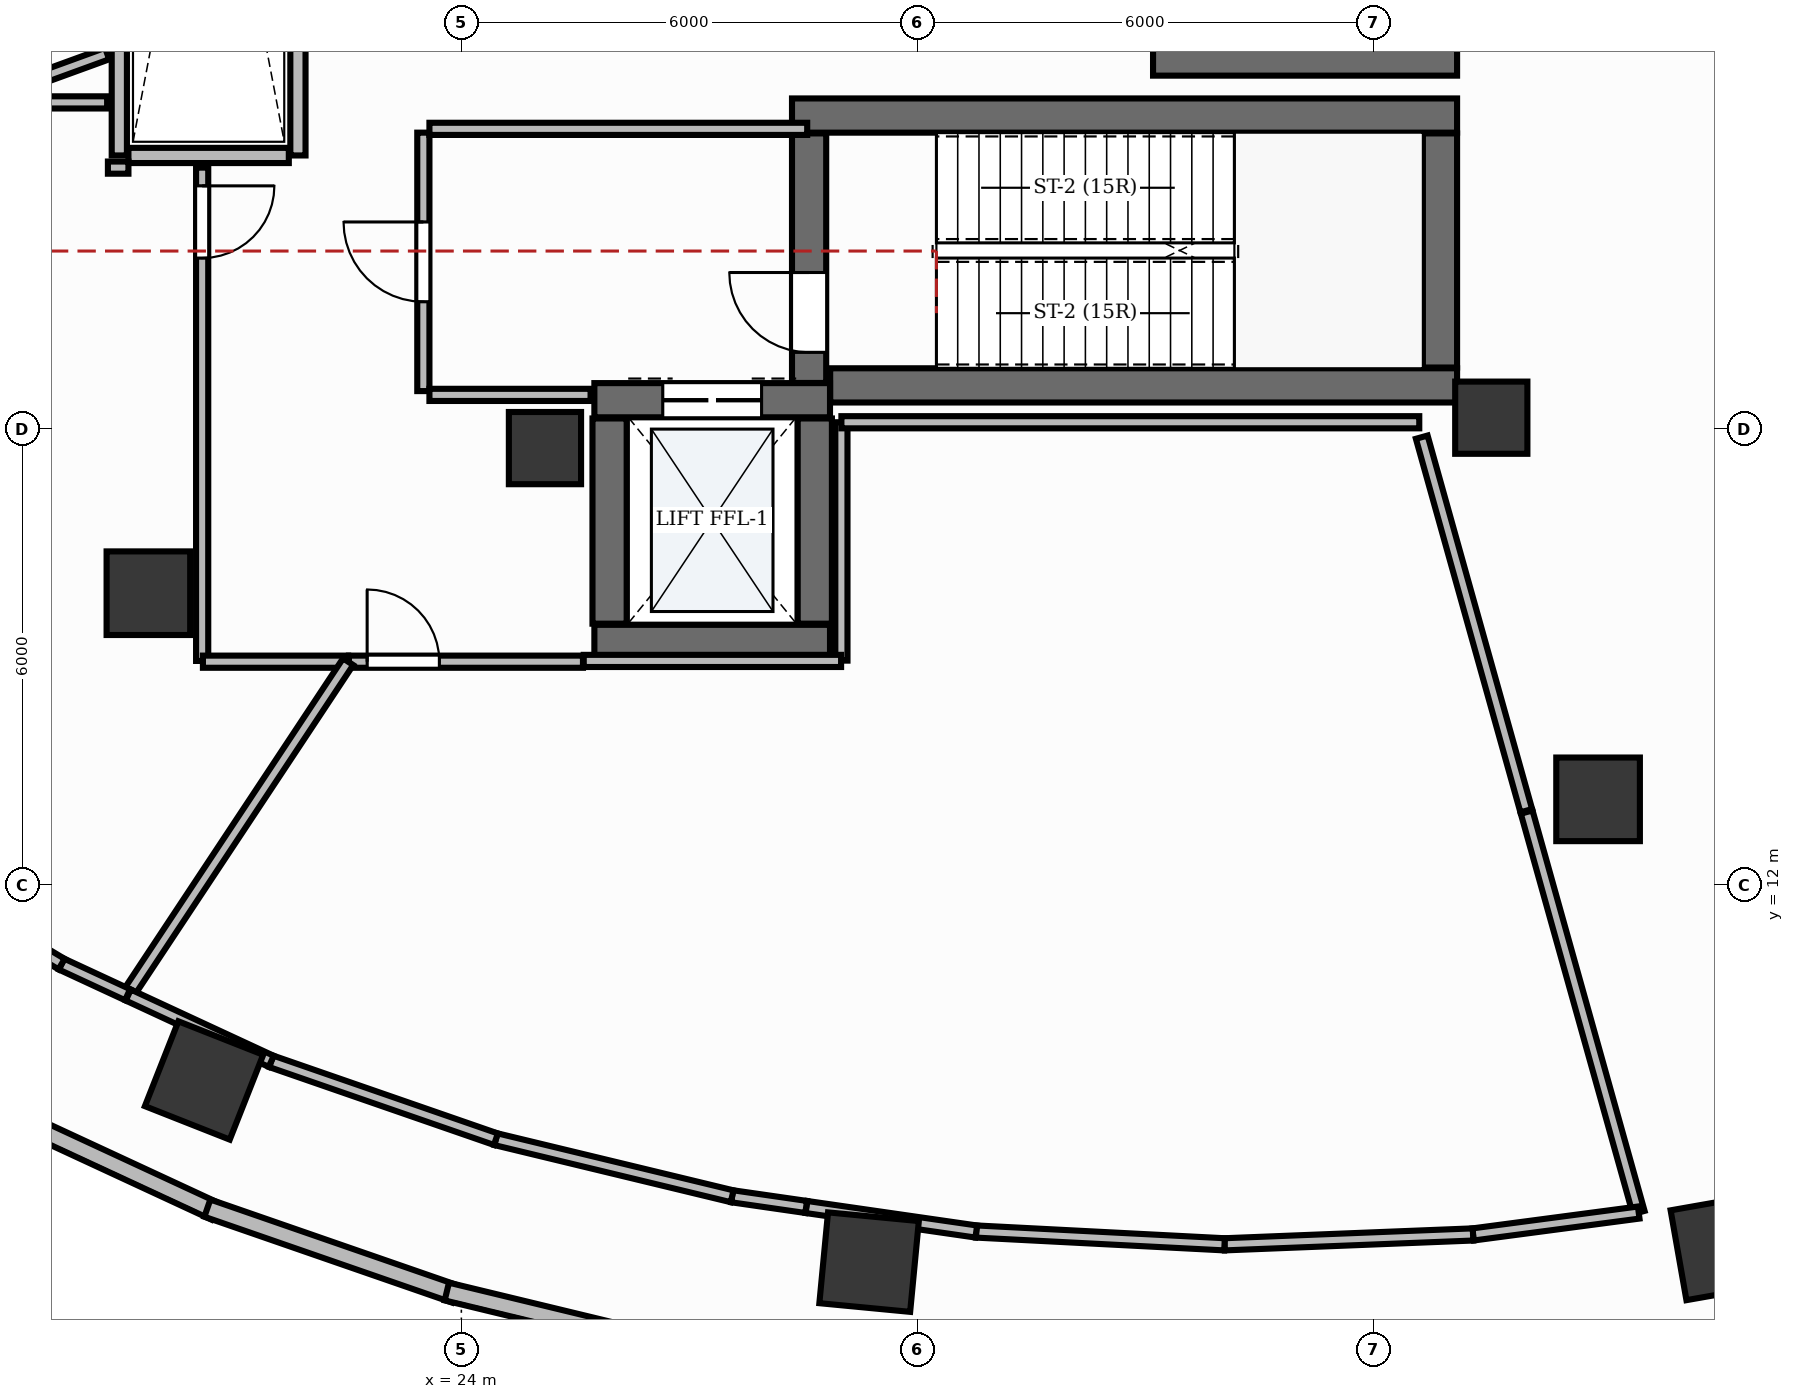
"""IFC4 building model, lengths in metres.
Left out: names, types, materials, properties, quantities, classifications, styles, units other than length and angle.
Written with IfcOpenShell. Run it as: python <this file> out.ifc"""

import sys

from ifc_helpers import new_model, si_unit, direction, frame, frame_2d, origin, origin_2d, place, context, subcontext, project, spatial, rectangle, extrude, element, fill, save


model = new_model("IFC4")
c1 = context("Model", 3, precision=1e-05, world=origin(), true_north=direction((0.0, 1.0)))
c2 = subcontext(c1, "Body", "Model", "MODEL_VIEW")
j1 = project(units=[si_unit("LENGTHUNIT", "METRE"), si_unit("PLANEANGLEUNIT", "RADIAN")], contexts=[c1])
p1 = place(None, origin())
s1 = spatial("IfcSite", under=j1, at=p1, CompositionType="ELEMENT")
p2 = place(p1, origin())
s2 = spatial("IfcBuilding", under=s1, at=p2, CompositionType="ELEMENT")
p3 = place(p2, frame((0.0, 0.0, 84.6)))
s3 = spatial("IfcBuildingStorey", under=s2, at=p3, CompositionType="ELEMENT", Elevation=84.6)
p4 = place(p3, frame((28.852, 18.575, 0.0), z_axis=(0.0, 0.0, 1.0), x_axis=(1.0, 0.0, 0.0)))
e1 = element("IfcWall", 1, at=p4, inside=s3, PredefinedType="SHEAR", context=c2, shape_type="SweptSolid", body=[
    extrude(rectangle(XDim=8.248, YDim=0.45, at=frame_2d((4.124, 0.0))), origin(), (0.0, 0.0, 1.0), 5.1),
])
p5 = place(p3, frame((28.35, 22.125, 0.0), z_axis=(0.0, 0.0, 1.0), x_axis=(1.0, 0.0, 0.0)))
e2 = element("IfcWall", 2, at=p5, inside=s3, PredefinedType="SHEAR", context=c2, shape_type="SweptSolid", body=[
    extrude(rectangle(XDim=8.75, YDim=0.45, at=frame_2d((4.375, 0.0))), origin(), (0.0, 0.0, 1.0), 5.1),
])
p6 = place(p3, frame((36.875, 18.81, 0.0), z_axis=(0.0, 0.0, 1.0), x_axis=(0.0, 1.0, 0.0)))
e3 = element("IfcWall", 3, at=p6, inside=s3, PredefinedType="SHEAR", context=c2, shape_type="SweptSolid", body=[
    extrude(rectangle(XDim=3.08, YDim=0.45, at=frame_2d((1.54, 0.0))), origin(), (0.0, 0.0, 1.0), 5.1),
])
p7 = place(p3, frame((28.575, 18.607, 0.0), z_axis=(0.0, 0.0, 1.0), x_axis=(0.0, 1.0, 0.0)))
e4 = element("IfcWall", 4, at=p7, inside=s3, PredefinedType="SHEAR", context=c2, shape_type="SweptSolid", body=[
    extrude(rectangle(XDim=3.283, YDim=0.45, at=frame_2d((1.642, 0.0))), origin(), (0.0, 0.0, 1.0), 5.1),
])
p8 = place(p7, frame((0.403, 0.0, 0.0)))
e5 = element("IfcOpeningElement", 5, at=p8, cuts=e4, PredefinedType="OPENING", context=c2, shape_type="SweptSolid", body=[
    extrude(rectangle(XDim=1.05, YDim=2.15, at=frame_2d((0.525, 1.075))), frame((0.0, 0.24, 0.0), z_axis=(0.0, -1.0, 0.0), x_axis=(1.0, 0.0, 0.0)), (0.0, 0.0, 1.0), 0.48),
])
p9 = place(p3, frame((33.1, 22.875, 0.0), z_axis=(0.0, 0.0, 1.0), x_axis=(1.0, 0.0, 0.0)))
e6 = element("IfcWall", 6, at=p9, inside=s3, PredefinedType="SHEAR", context=c2, shape_type="SweptSolid", body=[
    extrude(rectangle(XDim=4.0, YDim=0.45, at=frame_2d((2.0, 0.0))), origin(), (0.0, 0.0, 1.0), 5.1),
])
p10 = place(p3, frame((25.75, 15.2, 0.0), z_axis=(0.0, 0.0, 1.0), x_axis=(1.0, 0.0, 0.0)))
e7 = element("IfcWall", 7, at=p10, inside=s3, PredefinedType="SHEAR", context=c2, shape_type="SweptSolid", body=[
    extrude(rectangle(XDim=3.1, YDim=0.45, at=frame_2d((1.55, 0.0))), origin(), (0.0, 0.0, 1.0), 5.1),
])
p11 = place(p3, frame((25.75, 18.38, 0.0), z_axis=(0.0, 0.0, 1.0), x_axis=(1.0, 0.0, 0.0)))
e8 = element("IfcWall", 8, at=p11, inside=s3, PredefinedType="SHEAR", context=c2, shape_type="SweptSolid", body=[
    extrude(rectangle(XDim=3.1, YDim=0.45, at=frame_2d((1.55, 0.0))), origin(), (0.0, 0.0, 1.0), 5.1),
])
p12 = place(p11, frame((0.9, 0.0, 0.0)))
e9 = element("IfcOpeningElement", 9, at=p12, cuts=e8, PredefinedType="OPENING", context=c2, shape_type="SweptSolid", body=[
    extrude(rectangle(XDim=1.3, YDim=2.2, at=frame_2d((0.65, 1.1))), frame((0.0, 0.24, 0.0), z_axis=(0.0, -1.0, 0.0), x_axis=(1.0, 0.0, 0.0)), (0.0, 0.0, 1.0), 0.48),
])
for number, where, z_axis, x_axis in (
    (10, (25.95, 15.44, 0.0), (0.0, 0.0, 1.0), (0.0, 1.0, 0.0)),
    (11, (28.65, 15.44, 0.0), (0.0, 0.0, 1.0), (0.0, 1.0, 0.0)),
):
    element("IfcWall", number, at=place(p3, frame(where, z_axis=z_axis, x_axis=x_axis)), inside=s3, PredefinedType="SHEAR", context=c2, shape_type="SweptSolid", body=[
        extrude(rectangle(XDim=2.7, YDim=0.45, at=frame_2d((1.35, 0.0))), origin(), (0.0, 0.0, 1.0), 5.1),
    ])
for number, where, z_axis, x_axis in (
    (12, (25.1, 17.75, -0.0), (0.0, 0.0, 1.0), (1.0, 0.0, 0.0)),
    (13, (37.55, 18.15, -0.0), (0.0, 0.0, 1.0), (1.0, 0.0, 0.0)),
):
    element("IfcColumn", number, at=place(p3, frame(where, z_axis=z_axis, x_axis=x_axis)), inside=s3, PredefinedType="PILASTER", context=c2, shape_type="SweptSolid", body=[
        extrude(rectangle(XDim=0.95, YDim=0.95, at=origin_2d()), origin(), (0.0, 0.0, 1.0), 5.101),
    ])
p13 = place(p3, frame((19.883, 15.841, -0.0), z_axis=(0.0, 0.0, 1.0), x_axis=(1.0, 0.0, 0.0)))
e14 = element("IfcColumn", 14, at=p13, inside=s3, PredefinedType="COLUMN", context=c2, shape_type="SweptSolid", body=[
    extrude(rectangle(XDim=1.1, YDim=1.1, at=origin_2d()), origin(), (0.0, 0.0, 1.0), 5.101),
])
for number, where, z_axis, x_axis in (
    (15, (20.615, 9.431, -0.0), (0.0, 0.0, 1.0), (-0.93, 0.367, 0.0)),
    (16, (29.364, 7.041, -0.0), (0.0, 0.0, 1.0), (-0.995, 0.095, 0.0)),
    (17, (40.604, 7.235, -0.0), (0.0, 0.0, 1.0), (0.985, 0.173, 0.0)),
):
    element("IfcColumn", number, at=place(p3, frame(where, z_axis=z_axis, x_axis=x_axis)), inside=s3, PredefinedType="COLUMN", context=c2, shape_type="SweptSolid", body=[
        extrude(rectangle(XDim=1.2, YDim=1.2, at=origin_2d()), origin(), (0.0, 0.0, 1.0), 5.101),
    ])
p14 = place(p3, frame((38.955, 13.129, -0.0), z_axis=(0.0, 0.0, 1.0), x_axis=(1.0, 0.0, 0.0)))
e18 = element("IfcColumn", 18, at=p14, inside=s3, PredefinedType="COLUMN", context=c2, shape_type="SweptSolid", body=[
    extrude(rectangle(XDim=1.1, YDim=1.1, at=origin_2d()), origin(), (0.0, 0.0, 1.0), 5.101),
])
p15 = place(p3, frame((17.705, 9.127, 0.0), z_axis=(0.0, 0.0, 1.0), x_axis=(0.907209471649, -0.420679182454, 0.0)))
e19 = element("IfcWall", 19, at=p15, inside=s3, PredefinedType="STANDARD", context=c2, shape_type="SweptSolid", body=[
    extrude(rectangle(XDim=3.37, YDim=0.24, at=frame_2d((1.685, 0.0))), origin(), (0.0, 0.0, 1.0), 5.1),
])
p16 = place(p3, frame((20.658, 7.751, 0.0), z_axis=(0.0, 0.0, 1.0), x_axis=(0.944863079672, -0.327465663349, 0.0)))
e20 = element("IfcWall", 20, at=p16, inside=s3, PredefinedType="STANDARD", context=c2, shape_type="SweptSolid", body=[
    extrude(rectangle(XDim=3.448, YDim=0.24, at=frame_2d((1.724, 0.0))), origin(), (0.0, 0.0, 1.0), 4.67),
])
p17 = place(p3, frame((23.809, 6.654, 0.0), z_axis=(0.0, 0.0, 1.0), x_axis=(0.972031834852, -0.23484912611, 0.0)))
e21 = element("IfcWall", 21, at=p17, inside=s3, PredefinedType="STANDARD", context=c2, shape_type="SweptSolid", body=[
    extrude(rectangle(XDim=3.509, YDim=0.24, at=frame_2d((1.754, 0.0))), origin(), (0.0, 0.0, 1.0), 5.1),
])
for number, where, z_axis, x_axis in (
    (22, (19.5, 21.6, 0.0), (0.0, 0.0, 1.0), (0.0, 1.0, 0.0)),
    (23, (21.85, 21.6, 0.0), (0.0, 0.0, 1.0), (0.0, 1.0, 0.0)),
):
    element("IfcWall", number, at=place(p3, frame(where, z_axis=z_axis, x_axis=x_axis)), inside=s3, PredefinedType="PARTITIONING", context=c2, shape_type="SweptSolid", body=[
        extrude(rectangle(XDim=10.8, YDim=0.2, at=frame_2d((5.4, 0.0))), origin(), (0.0, 0.0, 1.0), 3.96),
    ])
p18 = place(p3, frame((19.62, 21.6, 0.0), z_axis=(0.0, 0.0, 1.0), x_axis=(1.0, 0.0, 0.0)))
e24 = element("IfcWall", 24, at=p18, inside=s3, PredefinedType="PARTITIONING", context=c2, shape_type="SweptSolid", body=[
    extrude(rectangle(XDim=2.11, YDim=0.2, at=frame_2d((1.055, 0.0))), origin(), (0.0, 0.0, 1.0), 3.96),
])
p19 = place(p3, frame((23.5, 18.5, 0.0), z_axis=(0.0, 0.0, 1.0), x_axis=(0.0, 1.0, 0.0)))
e25 = element("IfcWall", 25, at=p19, inside=s3, PredefinedType="PARTITIONING", context=c2, shape_type="SweptSolid", body=[
    extrude(rectangle(XDim=3.4, YDim=0.16, at=frame_2d((1.7, 0.0))), origin(), (0.0, 0.0, 1.0), 3.96),
])
p20 = place(p19, frame((1.175, 0.0, 0.0)))
e26 = element("IfcOpeningElement", 26, at=p20, cuts=e25, PredefinedType="OPENING", context=c2, shape_type="SweptSolid", body=[
    extrude(rectangle(XDim=1.05, YDim=2.15, at=frame_2d((0.525, 1.075))), frame((0.0, 0.095, 0.0), z_axis=(0.0, -1.0, 0.0), x_axis=(1.0, 0.0, 0.0)), (0.0, 0.0, 1.0), 0.19),
])
p21 = place(p3, frame((23.58, 21.95, 0.0), z_axis=(0.0, 0.0, 1.0), x_axis=(1.0, 0.0, 0.0)))
e27 = element("IfcWall", 27, at=p21, inside=s3, PredefinedType="PARTITIONING", context=c2, shape_type="SweptSolid", body=[
    extrude(rectangle(XDim=4.97, YDim=0.16, at=frame_2d((2.485, 0.0))), origin(), (0.0, 0.0, 1.0), 3.96),
])
p22 = place(p3, frame((23.58, 18.45, 0.0), z_axis=(0.0, 0.0, 1.0), x_axis=(1.0, 0.0, 0.0)))
e28 = element("IfcWall", 28, at=p22, inside=s3, PredefinedType="PARTITIONING", context=c2, shape_type="SweptSolid", body=[
    extrude(rectangle(XDim=2.12, YDim=0.16, at=frame_2d((1.06, 0.0))), origin(), (0.0, 0.0, 1.0), 3.96),
])
p23 = place(p3, frame((20.59, 21.44, 0.0), z_axis=(0.0, 0.0, 1.0), x_axis=(0.0, -1.0, 0.0)))
e29 = element("IfcWall", 29, at=p23, inside=s3, PredefinedType="PARTITIONING", context=c2, shape_type="SweptSolid", body=[
    extrude(rectangle(XDim=6.49, YDim=0.16, at=frame_2d((3.245, 0.0))), origin(), (0.0, 0.0, 1.0), 3.96),
])
p24 = place(p23, frame((0.24, 0.0, 0.0)))
e30 = element("IfcOpeningElement", 30, at=p24, cuts=e29, PredefinedType="OPENING", context=c2, shape_type="SweptSolid", body=[
    extrude(rectangle(XDim=0.95, YDim=2.15, at=frame_2d((0.475, 1.075))), frame((0.0, 0.095, 0.0), z_axis=(0.0, -1.0, 0.0), x_axis=(1.0, 0.0, 0.0)), (0.0, 0.0, 1.0), 0.19),
])
p25 = place(p3, frame((22.521, 14.94, 0.0), z_axis=(0.0, 0.0, 1.0), x_axis=(1.0, 0.0, 0.0)))
e31 = element("IfcWall", 31, at=p25, inside=s3, PredefinedType="PARTITIONING", context=c2, shape_type="SweptSolid", body=[
    extrude(rectangle(XDim=3.08, YDim=0.16, at=frame_2d((1.54, 0.0))), origin(), (0.0, 0.0, 1.0), 3.96),
])
p26 = place(p25, frame((0.24, 0.0, 0.0)))
e32 = element("IfcOpeningElement", 32, at=p26, cuts=e31, PredefinedType="OPENING", context=c2, shape_type="SweptSolid", body=[
    extrude(rectangle(XDim=0.95, YDim=2.15, at=frame_2d((0.475, 1.075))), frame((0.0, 0.095, 0.0), z_axis=(0.0, -1.0, 0.0), x_axis=(1.0, 0.0, 0.0)), (0.0, 0.0, 1.0), 0.19),
])
p27 = place(p3, frame((17.587, 22.298, 0.0), z_axis=(0.0, 0.0, 1.0), x_axis=(1.0, 0.0, 0.0)))
e33 = element("IfcWall", 33, at=p27, inside=s3, PredefinedType="PARTITIONING", context=c2, shape_type="SweptSolid", body=[
    extrude(rectangle(XDim=1.752, YDim=0.16, at=frame_2d((0.876, 0.0))), origin(), (0.0, 0.0, 1.0), 3.96),
])
p28 = place(p3, frame((19.35, 21.44, 0.0), z_axis=(0.0, 0.0, 1.0), x_axis=(1.0, 0.0, 0.0)))
e34 = element("IfcWall", 34, at=p28, inside=s3, PredefinedType="PARTITIONING", context=c2, shape_type="SweptSolid", body=[
    extrude(rectangle(XDim=0.27, YDim=0.16, at=frame_2d((0.135, 0.0))), origin(), (0.0, 0.0, 1.0), 3.96),
])
p29 = place(p3, frame((20.6, 14.94, 0.0), z_axis=(0.0, 0.0, 1.0), x_axis=(1.0, 0.0, 0.0)))
e35 = element("IfcWall", 35, at=p29, inside=s3, PredefinedType="PARTITIONING", context=c2, shape_type="SweptSolid", body=[
    extrude(rectangle(XDim=1.91, YDim=0.16, at=frame_2d((0.955, 0.0))), origin(), (0.0, 0.0, 1.0), 3.96),
])
p30 = place(p3, frame((22.51, 14.94, 0.0), z_axis=(0.0, 0.0, 1.0), x_axis=(-0.552178086977, -0.833726190222, 0.0)))
e36 = element("IfcWall", 36, at=p30, inside=s3, PredefinedType="PARTITIONING", context=c2, shape_type="SweptSolid", body=[
    extrude(rectangle(XDim=5.255, YDim=0.16, at=frame_2d((2.627, 0.0))), origin(), (0.0, 0.0, 1.0), 3.96),
])
p31 = place(p3, frame((19.609, 10.559, 0.0), z_axis=(0.0, 0.0, 1.0), x_axis=(-0.907203757034, 0.420691506004, 0.0)))
e37 = element("IfcWall", 37, at=p31, inside=s3, PredefinedType="PARTITIONING", context=c2, shape_type="SweptSolid", body=[
    extrude(rectangle(XDim=0.957, YDim=0.16, at=frame_2d((0.479, 0.0))), origin(), (0.0, 0.0, 1.0), 3.96),
])
p32 = place(p3, frame((18.74, 10.961, 0.0), z_axis=(0.0, 0.0, 1.0), x_axis=(-0.857635136716, 0.514258662805, 0.0)))
e38 = element("IfcWall", 38, at=p32, inside=s3, PredefinedType="PARTITIONING", context=c2, shape_type="SweptSolid", body=[
    extrude(rectangle(XDim=1.969, YDim=0.16, at=frame_2d((0.984, 0.0))), origin(), (0.0, 0.0, 1.0), 3.96),
])
p33 = place(p3, frame((29.0, 14.954, 0.0), z_axis=(0.0, 0.0, 1.0), x_axis=(0.0, 1.0, 0.0)))
e39 = element("IfcWall", 39, at=p33, inside=s3, PredefinedType="PARTITIONING", context=c2, shape_type="SweptSolid", body=[
    extrude(rectangle(XDim=3.136, YDim=0.16, at=frame_2d((1.568, 0.0))), origin(), (0.0, 0.0, 1.0), 3.96),
])
p34 = place(p3, frame((29.0, 18.09, 0.0), z_axis=(0.0, 0.0, 1.0), x_axis=(1.0, 0.0, 0.0)))
e40 = element("IfcWall", 40, at=p34, inside=s3, PredefinedType="PARTITIONING", context=c2, shape_type="SweptSolid", body=[
    extrude(rectangle(XDim=7.602, YDim=0.16, at=frame_2d((3.801, 0.0))), origin(), (0.0, 0.0, 1.0), 3.96),
])
p35 = place(p3, frame((36.635, 17.894, 0.0), z_axis=(0.0, 0.0, 1.0), x_axis=(0.269447140832, -0.96301518072, 0.0)))
e41 = element("IfcWall", 41, at=p35, inside=s3, PredefinedType="PARTITIONING", context=c2, shape_type="SweptSolid", body=[
    extrude(rectangle(XDim=5.103, YDim=0.16, at=frame_2d((2.552, 0.0))), origin(), (0.0, 0.0, 1.0), 3.96),
])
p36 = place(p3, frame((38.015, 12.961, 0.0), z_axis=(0.0, 0.0, 1.0), x_axis=(0.269459423955, -0.963011743875, 0.0)))
e42 = element("IfcWall", 42, at=p36, inside=s3, PredefinedType="PARTITIONING", context=c2, shape_type="SweptSolid", body=[
    extrude(rectangle(XDim=5.471, YDim=0.16, at=frame_2d((2.735, 0.0))), origin(), (0.0, 0.0, 1.0), 3.96),
])
p37 = place(p3, frame((39.49, 7.693, 0.0), z_axis=(0.0, 0.0, 1.0), x_axis=(-0.991360288821, -0.131166984214, 0.0)))
e43 = element("IfcWall", 43, at=p37, inside=s3, PredefinedType="PARTITIONING", context=c2, shape_type="SweptSolid", body=[
    extrude(rectangle(XDim=2.198, YDim=0.16, at=frame_2d((1.099, 0.0))), origin(), (0.0, 0.0, 1.0), 3.96),
])
p38 = place(p3, frame((37.31, 7.405, 0.0), z_axis=(0.0, 0.0, 1.0), x_axis=(-0.999211651373, -0.039699820652, 0.0)))
e44 = element("IfcWall", 44, at=p38, inside=s3, PredefinedType="PARTITIONING", context=c2, shape_type="SweptSolid", body=[
    extrude(rectangle(XDim=3.272, YDim=0.16, at=frame_2d((1.636, 0.0))), origin(), (0.0, 0.0, 1.0), 3.96),
])
p39 = place(p3, frame((34.04, 7.275, 0.0), z_axis=(0.0, 0.0, 1.0), x_axis=(-0.99867214707, 0.051516431032, 0.0)))
e45 = element("IfcWall", 45, at=p39, inside=s3, PredefinedType="PARTITIONING", context=c2, shape_type="SweptSolid", body=[
    extrude(rectangle(XDim=3.27, YDim=0.16, at=frame_2d((1.635, 0.0))), origin(), (0.0, 0.0, 1.0), 3.96),
])
p40 = place(p3, frame((30.774, 7.443, 0.0), z_axis=(0.0, 0.0, 1.0), x_axis=(-0.989738557631, 0.142890124003, 0.0)))
e46 = element("IfcWall", 46, at=p40, inside=s3, PredefinedType="PARTITIONING", context=c2, shape_type="SweptSolid", body=[
    extrude(rectangle(XDim=2.257, YDim=0.16, at=frame_2d((1.128, 0.0))), origin(), (0.0, 0.0, 1.0), 3.96),
])
p41 = place(p3, frame((28.536, 7.767, 0.0), z_axis=(0.0, 0.0, 1.0), x_axis=(-0.989765001386, 0.142706839468, 0.0)))
e47 = element("IfcWall", 47, at=p41, inside=s3, PredefinedType="PARTITIONING", context=c2, shape_type="SweptSolid", body=[
    extrude(rectangle(XDim=0.984, YDim=0.16, at=frame_2d((0.492, 0.0))), origin(), (0.0, 0.0, 1.0), 3.96),
])
p42 = place(p3, frame((27.562, 7.907, 0.0), z_axis=(0.0, 0.0, 1.0), x_axis=(-0.972038947661, 0.234819684504, 0.0)))
e48 = element("IfcWall", 48, at=p42, inside=s3, PredefinedType="PARTITIONING", context=c2, shape_type="SweptSolid", body=[
    extrude(rectangle(XDim=3.197, YDim=0.16, at=frame_2d((1.599, 0.0))), origin(), (0.0, 0.0, 1.0), 3.96),
])
p43 = place(p3, frame((24.455, 8.658, 0.0), z_axis=(0.0, 0.0, 1.0), x_axis=(-0.944878380746, 0.327421510592, 0.0)))
e49 = element("IfcWall", 49, at=p43, inside=s3, PredefinedType="PARTITIONING", context=c2, shape_type="SweptSolid", body=[
    extrude(rectangle(XDim=3.128, YDim=0.16, at=frame_2d((1.564, 0.0))), origin(), (0.0, 0.0, 1.0), 3.96),
])
p44 = place(p3, frame((21.499, 9.682, 0.0), z_axis=(0.0, 0.0, 1.0), x_axis=(-0.907161523732, 0.420782568388, 0.0)))
e50 = element("IfcWall", 50, at=p44, inside=s3, PredefinedType="PARTITIONING", context=c2, shape_type="SweptSolid", body=[
    extrude(rectangle(XDim=2.073, YDim=0.16, at=frame_2d((1.037, 0.0))), origin(), (0.0, 0.0, 1.0), 3.96),
])
p45 = place(p3, frame((25.61, 14.95, 0.0), z_axis=(0.0, 0.0, 1.0), x_axis=(1.0, 0.0, 0.0)))
e51 = element("IfcWall", 51, at=p45, inside=s3, PredefinedType="PARTITIONING", context=c2, shape_type="SweptSolid", body=[
    extrude(rectangle(XDim=3.386, YDim=0.16, at=frame_2d((1.693, 0.0))), origin(), (0.0, 0.0, 1.0), 3.96),
])
p46 = place(p3, frame((19.34, 22.94, 0.0), z_axis=(0.0, 0.0, 1.0), x_axis=(-0.939714591609, -0.341959772952, 0.0)))
e52 = element("IfcWall", 52, at=p46, inside=s3, PredefinedType="PARTITIONING", context=c2, shape_type="SweptSolid", body=[
    extrude(rectangle(XDim=1.176, YDim=0.16, at=frame_2d((0.588, 0.0))), origin(), (0.0, 0.0, 1.0), 3.96),
])
p47 = place(p8, origin())
e53 = element("IfcDoor", 53, at=p47, inside=s3, OperationType="SINGLE_SWING_RIGHT", PredefinedType="DOOR", context=c2, shape_type="SweptSolid", body=[
    extrude(rectangle(XDim=1.05, YDim=2.15, at=frame_2d((0.525, 1.075))), frame((0.0, 0.025, 0.0), z_axis=(0.0, -1.0, 0.0), x_axis=(1.0, 0.0, 0.0)), (0.0, 0.0, 1.0), 0.05),
])
fill(e5, e53)
p48 = place(p12, origin())
e54 = element("IfcDoor", 54, at=p48, inside=s3, OperationType="DOUBLE_DOOR_SLIDING", PredefinedType="DOOR", context=c2, shape_type="SweptSolid", body=[
    extrude(rectangle(XDim=1.3, YDim=2.2, at=frame_2d((0.65, 1.1))), frame((0.0, 0.025, 0.0), z_axis=(0.0, -1.0, 0.0), x_axis=(1.0, 0.0, 0.0)), (0.0, 0.0, 1.0), 0.05),
])
fill(e9, e54)
p49 = place(p20, origin())
e55 = element("IfcDoor", 55, at=p49, inside=s3, OperationType="SINGLE_SWING_RIGHT", PredefinedType="DOOR", context=c2, shape_type="SweptSolid", body=[
    extrude(rectangle(XDim=1.05, YDim=2.15, at=frame_2d((0.525, 1.075))), frame((0.0, 0.025, 0.0), z_axis=(0.0, -1.0, 0.0), x_axis=(1.0, 0.0, 0.0)), (0.0, 0.0, 1.0), 0.05),
])
fill(e26, e55)
p50 = place(p24, origin())
e56 = element("IfcDoor", 56, at=p50, inside=s3, OperationType="SINGLE_SWING_LEFT", PredefinedType="DOOR", context=c2, shape_type="SweptSolid", body=[
    extrude(rectangle(XDim=0.95, YDim=2.15, at=frame_2d((0.475, 1.075))), frame((0.0, 0.025, 0.0), z_axis=(0.0, -1.0, 0.0), x_axis=(1.0, 0.0, 0.0)), (0.0, 0.0, 1.0), 0.05),
])
fill(e30, e56)
p51 = place(p26, origin())
e57 = element("IfcDoor", 57, at=p51, inside=s3, OperationType="SINGLE_SWING_LEFT", PredefinedType="DOOR", context=c2, shape_type="SweptSolid", body=[
    extrude(rectangle(XDim=0.95, YDim=2.15, at=frame_2d((0.475, 1.075))), frame((0.0, 0.025, 0.0), z_axis=(0.0, -1.0, 0.0), x_axis=(1.0, 0.0, 0.0)), (0.0, 0.0, 1.0), 0.05),
])
fill(e32, e57)
save(model, sys.argv[1])
